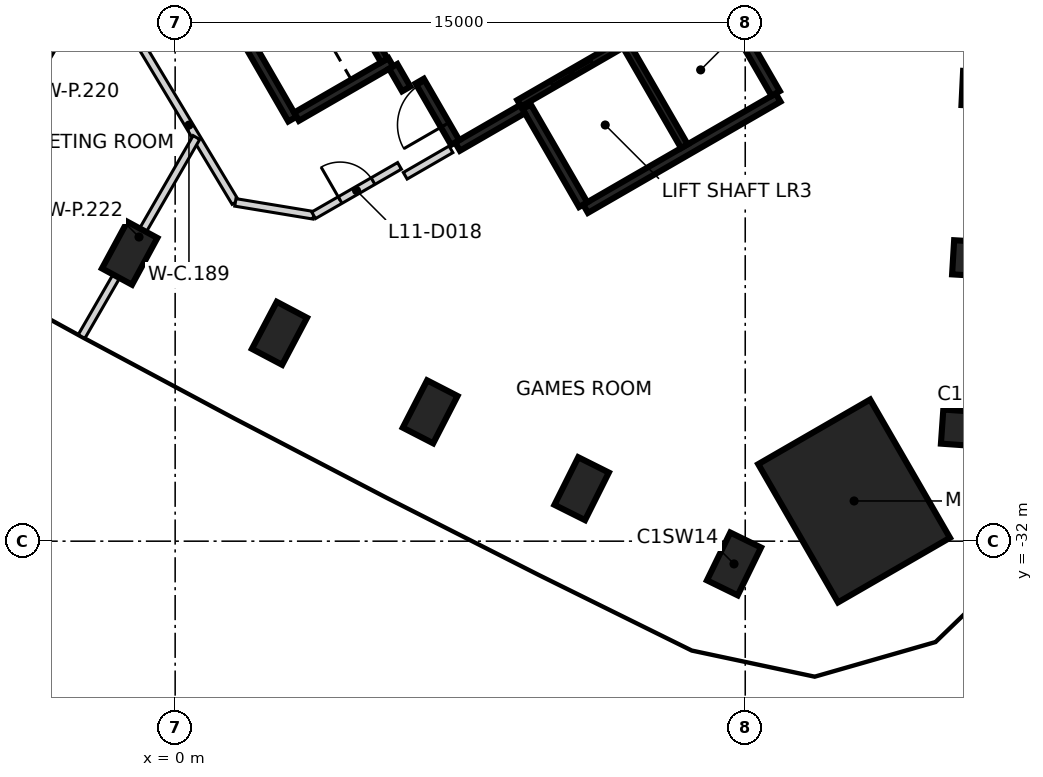
"""IFC4 building model, lengths in metres.
Left out: names, types, materials, properties, quantities, classifications, styles, units other than length and angle.
Written with IfcOpenShell. Run it as: python <this file> out.ifc"""

import sys

from ifc_helpers import new_model, si_unit, direction, frame, frame_2d, origin, origin_2d, place, context, subcontext, project, spatial, rectangle, extrude, element, fill, save


model = new_model("IFC4")
c1 = context("Model", 3, precision=1e-05, world=origin(), true_north=direction((0.0, 1.0)))
c2 = subcontext(c1, "Body", "Model", "MODEL_VIEW")
j1 = project(units=[si_unit("LENGTHUNIT", "METRE"), si_unit("PLANEANGLEUNIT", "RADIAN")], contexts=[c1])
p1 = place(None, origin())
s1 = spatial("IfcSite", under=j1, at=p1, CompositionType="ELEMENT")
p2 = place(p1, origin())
s2 = spatial("IfcBuilding", under=s1, at=p2, CompositionType="ELEMENT")
p3 = place(p2, frame((0.0, 0.0, 53.0)))
s3 = spatial("IfcBuildingStorey", under=s2, at=p3, CompositionType="ELEMENT", Elevation=53.0)
for number, where, z_axis, x_axis in (
    (1, (20.879, -29.034, -0.475), (0.0, 0.0, 1.0), (-0.998, 0.07, 0.0)),
    (2, (21.169, -24.573, -0.475), (0.0, 0.0, 1.0), (-0.998, 0.06, 0.0)),
    (3, (21.41, -20.109, -0.475), (0.0, 0.0, 1.0), (-0.999, 0.048, 0.0)),
    (4, (-1.197, -24.423, -0.475), (0.0, 0.0, 1.0), (0.476, 0.879, 0.0)),
    (5, (2.745, -26.531, -0.475), (0.0, 0.0, 1.0), (0.467, 0.884, 0.0)),
    (6, (6.71, -28.596, -0.475), (0.0, 0.0, 1.0), (0.458, 0.889, 0.0)),
    (7, (10.696, -30.619, -0.475), (0.0, 0.0, 1.0), (0.447, 0.894, 0.0)),
    (8, (14.705, -32.599, -0.475), (0.0, 0.0, 1.0), (0.438, 0.899, 0.0)),
):
    element("IfcColumn", number, at=place(p3, frame(where, z_axis=z_axis, x_axis=x_axis)), inside=s3, PredefinedType="COLUMN", context=c2, shape_type="SweptSolid", body=[
        extrude(rectangle(XDim=1.4, YDim=0.9, at=origin_2d()), origin(), (0.0, 0.0, 1.0), 3.6),
    ])
p4 = place(p3, frame((17.865, -30.942, -0.475), z_axis=(0.0, 0.0, 1.0), x_axis=(-0.5, 0.866025403784, 0.0)))
e9 = element("IfcColumn", 9, at=p4, inside=s3, PredefinedType="COLUMN", context=c2, shape_type="SweptSolid", body=[
    extrude(rectangle(XDim=4.2, YDim=3.4, at=origin_2d()), origin(), (0.0, 0.0, 1.0), 3.6),
])
p5 = place(p3, frame((15.865, -20.328, 0.0), z_axis=(0.0, 0.0, 1.0), x_axis=(-0.86602852612, -0.499994591916, 0.0)))
e10 = element("IfcWall", 10, at=p5, inside=s3, PredefinedType="SHEAR", context=c2, shape_type="SweptSolid", body=[
    extrude(rectangle(XDim=5.85, YDim=0.25, at=frame_2d((2.925, 0.0))), origin(), (0.0, 0.0, 1.0), 3.125),
])
for number, where, z_axis, x_axis in (
    (11, (14.315, -17.644, 0.0), (0.0, 0.0, 1.0), (0.5, -0.866, 0.0)),
    (12, (10.736, -23.145, 0.0), (0.0, 0.0, 1.0), (-0.5, 0.866, 0.0)),
):
    element("IfcWall", number, at=place(p3, frame(where, z_axis=z_axis, x_axis=x_axis)), inside=s3, PredefinedType="SHEAR", context=c2, shape_type="SweptSolid", body=[
        extrude(rectangle(XDim=2.974, YDim=0.25, at=frame_2d((1.487, 0.0))), origin(), (0.0, 0.0, 1.0), 3.125),
    ])
p6 = place(p3, frame((3.085, -20.894, 0.0), z_axis=(0.0, 0.0, 1.0), x_axis=(-0.499978833458, 0.866037623948, 0.0)))
e13 = element("IfcWall", 13, at=p6, inside=s3, PredefinedType="SHEAR", context=c2, shape_type="SweptSolid", body=[
    extrude(rectangle(XDim=3.05, YDim=0.25, at=frame_2d((1.525, 0.0))), origin(), (0.0, 0.0, 1.0), 3.125),
])
p7 = place(p3, frame((5.675, -19.399, 0.0), z_axis=(0.0, 0.0, 1.0), x_axis=(-0.866026637627, -0.499997862916, 0.0)))
e14 = element("IfcWall", 14, at=p7, inside=s3, PredefinedType="SHEAR", context=c2, shape_type="SweptSolid", body=[
    extrude(rectangle(XDim=2.865, YDim=0.25, at=frame_2d((1.432, 0.0))), origin(), (0.0, 0.0, 1.0), 3.125),
])
p8 = place(p3, frame((9.14, -20.631, 0.0), z_axis=(0.0, 0.0, 1.0), x_axis=(-0.866043531843, -0.499968599967, 0.0)))
e15 = element("IfcWall", 15, at=p8, inside=s3, PredefinedType="SHEAR", context=c2, shape_type="SweptSolid", body=[
    extrude(rectangle(XDim=1.975, YDim=0.25, at=frame_2d((0.987, 0.0))), origin(), (0.0, 0.0, 1.0), 3.125),
])
p9 = place(p3, frame((7.367, -21.51, 0.0), z_axis=(0.0, 0.0, 1.0), x_axis=(-0.499983108224, 0.866035156036, 0.0)))
e16 = element("IfcWall", 16, at=p9, inside=s3, PredefinedType="SHEAR", context=c2, shape_type="SweptSolid", body=[
    extrude(rectangle(XDim=1.865, YDim=0.25, at=frame_2d((0.932, 0.0))), origin(), (0.0, 0.0, 1.0), 3.125),
])
p10 = place(p9, frame((0.535, 0.0, 0.0)))
e17 = element("IfcOpeningElement", 17, at=p10, cuts=e16, PredefinedType="OPENING", context=c2, shape_type="SweptSolid", body=[
    extrude(rectangle(XDim=1.25, YDim=2.1, at=frame_2d((0.625, 1.05))), frame((0.0, 0.135, 0.0), z_axis=(0.0, -1.0, 0.0), x_axis=(1.0, 0.0, 0.0)), (0.0, 0.0, 1.0), 0.27),
])
p11 = place(p3, frame((6.08, -20.1, 0.0), z_axis=(0.0, 0.0, 1.0), x_axis=(-0.500051773299, 0.865995510393, 0.0)))
e18 = element("IfcWall", 18, at=p11, inside=s3, PredefinedType="SHEAR", context=c2, shape_type="SweptSolid", body=[
    extrude(rectangle(XDim=0.685, YDim=0.25, at=frame_2d((0.342, 0.0))), origin(), (0.0, 0.0, 1.0), 3.125),
])
p12 = place(p3, frame((9.052, -20.48, 0.0), z_axis=(0.0, 0.0, 1.0), x_axis=(0.866030299012, 0.499991521122, 0.0)))
e19 = element("IfcWall", 19, at=p12, inside=s3, PredefinedType="SHEAR", context=c2, shape_type="SweptSolid", body=[
    extrude(rectangle(XDim=6.1, YDim=0.2, at=frame_2d((3.05, 0.0))), origin(), (0.0, 0.0, 1.0), 3.125),
])
p13 = place(p12, frame((1.0, 0.0, 0.0)))
e20 = element("IfcOpeningElement", 20, at=p13, cuts=e19, PredefinedType="OPENING", context=c2, shape_type="SweptSolid", body=[
    extrude(rectangle(XDim=1.2, YDim=2.1, at=frame_2d((0.6, 1.05))), frame((0.0, 0.11, 0.0), z_axis=(0.0, -1.0, 0.0), x_axis=(1.0, 0.0, 0.0)), (0.0, 0.0, 1.0), 0.22),
])
p14 = place(p12, frame((4.05, 0.0, 0.0)))
e21 = element("IfcOpeningElement", 21, at=p14, cuts=e19, PredefinedType="OPENING", context=c2, shape_type="SweptSolid", body=[
    extrude(rectangle(XDim=1.2, YDim=2.1, at=frame_2d((0.6, 1.05))), frame((0.0, 0.11, 0.0), z_axis=(0.0, -1.0, 0.0), x_axis=(1.0, 0.0, 0.0)), (0.0, 0.0, 1.0), 0.22),
])
p15 = place(p3, frame((11.875, -18.967, 0.0), z_axis=(0.0, 0.0, 1.0), x_axis=(0.49998131003, -0.866036194175, 0.0)))
e22 = element("IfcWall", 22, at=p15, inside=s3, PredefinedType="SHEAR", context=c2, shape_type="SweptSolid", body=[
    extrude(rectangle(XDim=3.048, YDim=0.2, at=frame_2d((1.524, 0.0))), origin(), (0.0, 0.0, 1.0), 3.125),
])
p16 = place(p3, frame((5.503, -19.352, 0.0), z_axis=(0.0, 0.0, 1.0), x_axis=(-0.499986818241, 0.866033014143, 0.0)))
e23 = element("IfcWall", 23, at=p16, inside=s3, PredefinedType="SHEAR", context=c2, shape_type="SweptSolid", body=[
    extrude(rectangle(XDim=2.798, YDim=0.2, at=frame_2d((1.399, 0.0))), origin(), (0.0, 0.0, 1.0), 3.125),
])
p17 = place(p16, frame((0.949, 0.0, 0.0)))
e24 = element("IfcOpeningElement", 24, at=p17, cuts=e23, PredefinedType="OPENING", context=c2, shape_type="SweptSolid", body=[
    extrude(rectangle(XDim=0.9, YDim=2.1, at=frame_2d((0.45, 1.05))), frame((0.0, 0.11, 0.0), z_axis=(0.0, -1.0, 0.0), x_axis=(1.0, 0.0, 0.0)), (0.0, 0.0, 1.0), 0.22),
])
p18 = place(p3, frame((-0.858, -19.017, 0.0), z_axis=(0.0, 0.0, 1.0), x_axis=(0.514647068805, -0.857402119528, 0.0)))
e25 = element("IfcWall", 25, at=p18, inside=s3, PredefinedType="PARTITIONING", context=c2, shape_type="SweptSolid", body=[
    extrude(rectangle(XDim=4.745, YDim=0.2, at=frame_2d((2.373, 0.0))), origin(), (0.0, 0.0, 1.0), 3.125),
])
p19 = place(p3, frame((1.584, -23.086, 0.0), z_axis=(0.0, 0.0, 1.0), x_axis=(0.986633159246, -0.162957077405, 0.0)))
e26 = element("IfcWall", 26, at=p19, inside=s3, PredefinedType="PARTITIONING", context=c2, shape_type="SweptSolid", body=[
    extrude(rectangle(XDim=2.087, YDim=0.2, at=frame_2d((1.043, 0.0))), origin(), (0.0, 0.0, 1.0), 3.125),
])
p20 = place(p3, frame((3.643, -23.426, 0.0), z_axis=(0.0, 0.0, 1.0), x_axis=(0.866654350985, 0.498909045738, 0.0)))
e27 = element("IfcWall", 27, at=p20, inside=s3, PredefinedType="PARTITIONING", context=c2, shape_type="SweptSolid", body=[
    extrude(rectangle(XDim=2.608, YDim=0.2, at=frame_2d((1.304, 0.0))), origin(), (0.0, 0.0, 1.0), 3.125),
])
p21 = place(p20, frame((0.804, 0.0, 0.0)))
e28 = element("IfcOpeningElement", 28, at=p21, cuts=e27, PredefinedType="OPENING", context=c2, shape_type="SweptSolid", body=[
    extrude(rectangle(XDim=1.0, YDim=2.1, at=frame_2d((0.5, 1.05))), frame((0.0, 0.11, 0.0), z_axis=(0.0, -1.0, 0.0), x_axis=(1.0, 0.0, 0.0)), (0.0, 0.0, 1.0), 0.22),
])
p22 = place(p3, frame((6.054, -22.385, 0.0), z_axis=(0.0, 0.0, 1.0), x_axis=(0.86593101922, 0.500163443238, 0.0)))
e29 = element("IfcWall", 29, at=p22, inside=s3, PredefinedType="PARTITIONING", context=c2, shape_type="SweptSolid", body=[
    extrude(rectangle(XDim=1.39, YDim=0.2, at=frame_2d((0.695, 0.0))), origin(), (0.0, 0.0, 1.0), 3.125),
])
p23 = place(p3, frame((-6.381, -24.464, 0.0), z_axis=(0.0, 0.0, 1.0), x_axis=(0.500007577232, 0.866021029023, 0.0)))
e30 = element("IfcWall", 30, at=p23, inside=s3, PredefinedType="PARTITIONING", context=c2, shape_type="SweptSolid", body=[
    extrude(rectangle(XDim=9.883, YDim=0.2, at=frame_2d((4.941, 0.0))), origin(), (0.0, 0.0, 1.0), 3.125),
])
p24 = place(p3, frame((-2.462, -26.615, 0.0), z_axis=(0.0, 0.0, 1.0), x_axis=(0.49992636536, 0.86606791259, 0.0)))
e31 = element("IfcWall", 31, at=p24, inside=s3, PredefinedType="PARTITIONING", context=c2, shape_type="SweptSolid", body=[
    extrude(rectangle(XDim=6.046, YDim=0.2, at=frame_2d((3.023, 0.0))), origin(), (0.0, 0.0, 1.0), 3.125),
])
p25 = place(p13, origin())
e32 = element("IfcDoor", 32, at=p25, inside=s3, OperationType="DOUBLE_DOOR_SLIDING", PredefinedType="DOOR", context=c2, shape_type="SweptSolid", body=[
    extrude(rectangle(XDim=1.2, YDim=2.1, at=frame_2d((0.6, 1.05))), frame((0.0, 0.025, 0.0), z_axis=(0.0, -1.0, 0.0), x_axis=(1.0, 0.0, 0.0)), (0.0, 0.0, 1.0), 0.05),
])
fill(e20, e32)
p26 = place(p10, origin())
e33 = element("IfcDoor", 33, at=p26, inside=s3, OperationType="SINGLE_SWING_LEFT", PredefinedType="DOOR", context=c2, shape_type="SweptSolid", body=[
    extrude(rectangle(XDim=1.25, YDim=2.1, at=frame_2d((0.625, 1.05))), frame((0.0, 0.025, 0.0), z_axis=(0.0, -1.0, 0.0), x_axis=(1.0, 0.0, 0.0)), (0.0, 0.0, 1.0), 0.05),
])
fill(e17, e33)
p27 = place(p21, frame((1.0, 0.0, 0.0), z_axis=(0.0, 0.0, 1.0), x_axis=(-1.0, 0.0, 0.0)))
e34 = element("IfcDoor", 34, at=p27, inside=s3, OperationType="SINGLE_SWING_LEFT", PredefinedType="DOOR", context=c2, shape_type="SweptSolid", body=[
    extrude(rectangle(XDim=1.0, YDim=2.1, at=frame_2d((0.5, 1.05))), frame((0.0, 0.025, 0.0), z_axis=(0.0, -1.0, 0.0), x_axis=(1.0, 0.0, 0.0)), (0.0, 0.0, 1.0), 0.05),
])
fill(e28, e34)
save(model, sys.argv[1])
